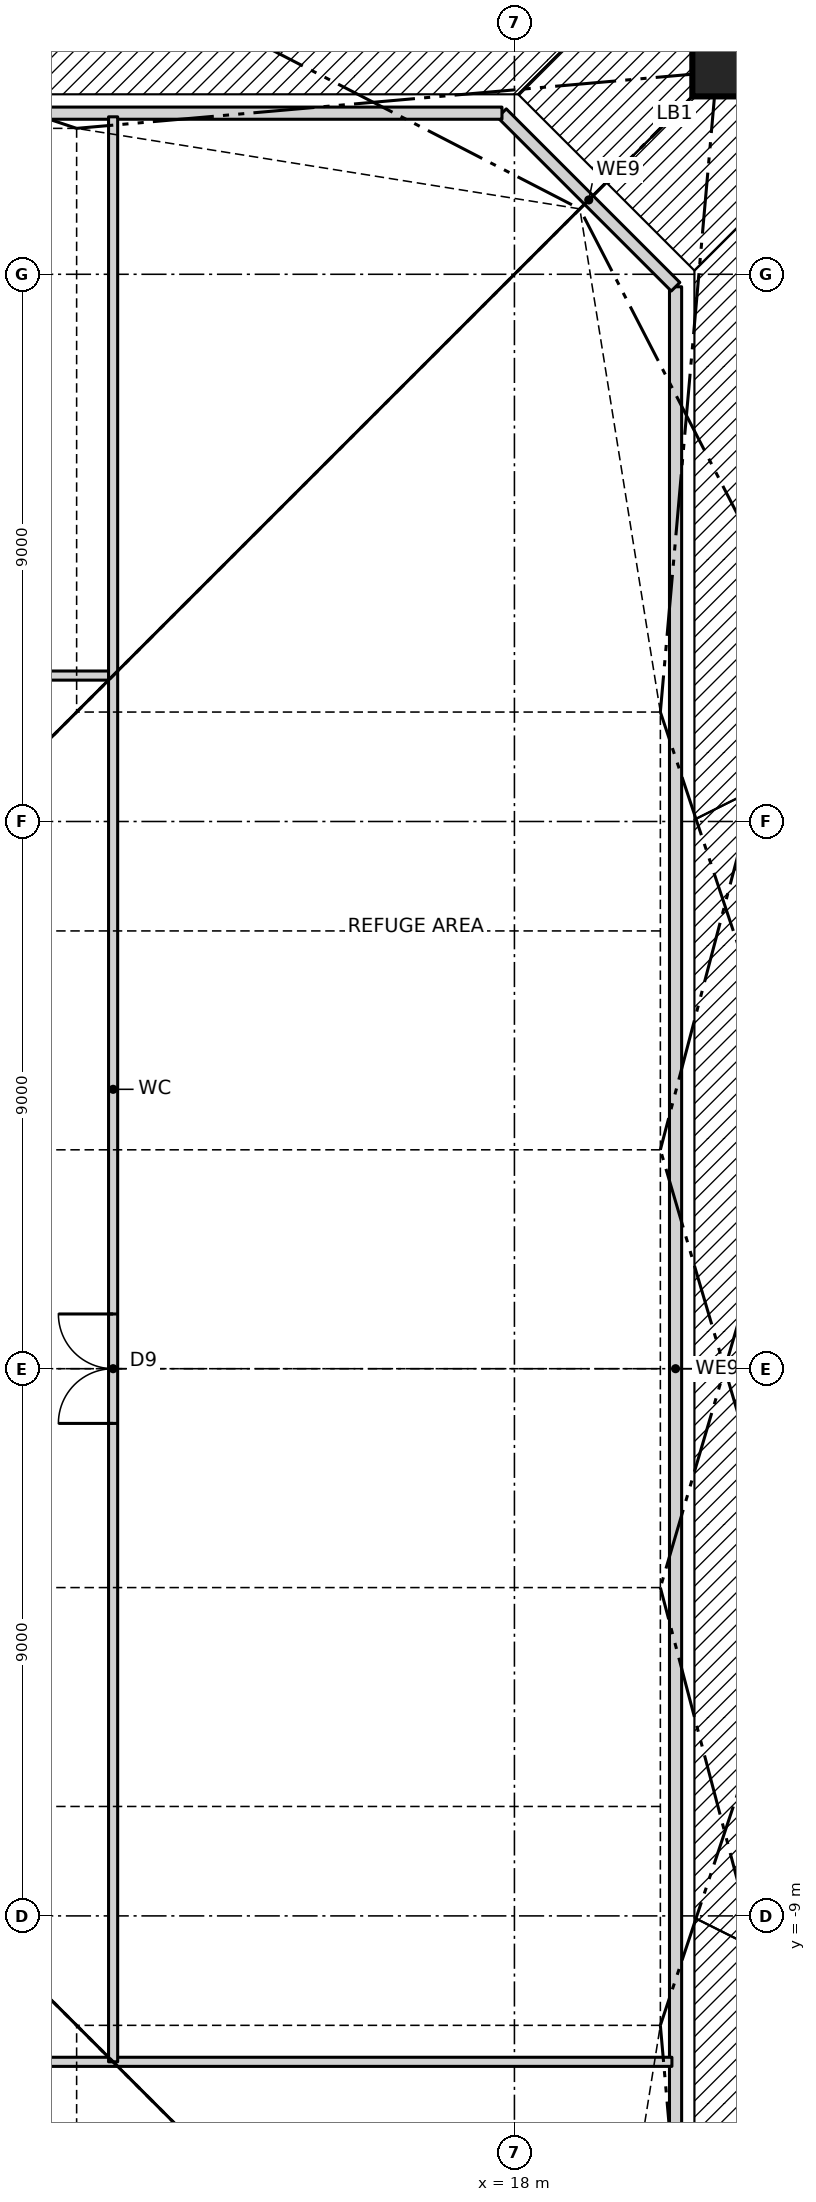
"""IFC4 building model, lengths in metres.
Left out: names, types, materials, properties, quantities, classifications, styles, units other than length and angle.
Written with IfcOpenShell. Run it as: python <this file> out.ifc"""

import sys

from ifc_helpers import new_model, si_unit, direction, frame, frame_2d, origin, origin_2d, place, context, subcontext, project, spatial, rectangle, hollow_rectangle, extrude, clip, halfspace, element, fill, save


model = new_model("IFC4")
c1 = context("Model", 3, precision=1e-05, world=origin(), true_north=direction((0.0, 1.0)))
c2 = subcontext(c1, "Body", "Model", "MODEL_VIEW")
j1 = project(units=[si_unit("LENGTHUNIT", "METRE"), si_unit("PLANEANGLEUNIT", "RADIAN")], contexts=[c1])
p1 = place(None, origin())
s1 = spatial("IfcSite", under=j1, at=p1, CompositionType="ELEMENT")
p2 = place(p1, origin())
s2 = spatial("IfcBuilding", under=s1, at=p2, CompositionType="ELEMENT")
p3 = place(p2, frame((0.0, 0.0, 74.5)))
s3 = spatial("IfcBuildingStorey", under=s2, at=p3, CompositionType="ELEMENT", Elevation=74.5)
p4 = place(p3, frame((22.65, -12.15, 0.0), z_axis=(-0.343583115532, 0.206127500627, 0.91622164142), x_axis=(-0.514454704863, -0.857517554715, 0.0)))
e1 = element("IfcColumn", 1, at=p4, inside=s3, PredefinedType="COLUMN", context=c2, shape_type="Clipping", body=[
    clip(clip(extrude(hollow_rectangle(XDim=0.8, YDim=0.8, WallThickness=0.09, at=origin_2d()), origin(), (0.0, 0.0, 1.0), 6.549), halfspace(frame((0.0, 0.0, 0.0), z_axis=(0.0, -0.400671815572, -0.91622164142), x_axis=(-0.514454704863, 0.785676141527, -0.343583115532)), False)), halfspace(frame((0.0, 2.404, 5.497), z_axis=(0.0, 0.400671815572, 0.91622164142), x_axis=(-0.514454704863, 0.785676141527, -0.343583115532)), False)),
])
p5 = place(p3, frame((22.65, -4.05, 0.0), z_axis=(-0.350261033367, 0.070044605522, 0.934029422311), x_axis=(-0.196095673508, -0.980584767795, 0.0)))
e2 = element("IfcColumn", 2, at=p5, inside=s3, PredefinedType="COLUMN", context=c2, shape_type="Clipping", body=[
    clip(clip(extrude(hollow_rectangle(XDim=0.8, YDim=0.8, WallThickness=0.09, at=origin_2d()), origin(), (0.0, 0.0, 1.0), 6.424), halfspace(frame((0.0, 0.0, 0.0), z_axis=(0.0, -0.357196078167, -0.934029422311), x_axis=(-0.196095673508, 0.91589502419, -0.350261033367)), False)), halfspace(frame((0.0, 2.143, 5.604), z_axis=(0.0, 0.357196078167, 0.934029422311), x_axis=(-0.196095673508, 0.91589502419, -0.350261033367)), False)),
])
p6 = place(p3, frame((22.65, 4.05, 0.0), z_axis=(-0.350261033367, -0.070044605522, 0.934029422311), x_axis=(0.196095673508, -0.980584767795, 0.0)))
e3 = element("IfcColumn", 3, at=p6, inside=s3, PredefinedType="COLUMN", context=c2, shape_type="Clipping", body=[
    clip(clip(extrude(hollow_rectangle(XDim=0.8, YDim=0.8, WallThickness=0.09, at=origin_2d()), origin(), (0.0, 0.0, 1.0), 6.424), halfspace(frame((0.0, 0.0, 0.0), z_axis=(0.0, -0.357196078167, -0.934029422311), x_axis=(0.196095673508, 0.91589502419, -0.350261033367)), False)), halfspace(frame((0.0, 2.143, 5.604), z_axis=(0.0, 0.357196078167, 0.934029422311), x_axis=(0.196095673508, 0.91589502419, -0.350261033367)), False)),
])
p7 = place(p3, frame((22.65, 12.15, 0.0), z_axis=(-0.343583115532, -0.206127500627, 0.91622164142), x_axis=(0.514454704863, -0.857517554715, 0.0)))
e4 = element("IfcColumn", 4, at=p7, inside=s3, PredefinedType="COLUMN", context=c2, shape_type="Clipping", body=[
    clip(clip(extrude(hollow_rectangle(XDim=0.8, YDim=0.8, WallThickness=0.09, at=origin_2d()), origin(), (0.0, 0.0, 1.0), 6.549), halfspace(frame((0.0, 0.0, 0.0), z_axis=(0.0, -0.400671815572, -0.91622164142), x_axis=(0.514454704863, 0.785676141527, -0.343583115532)), False)), halfspace(frame((0.0, 2.404, 5.497), z_axis=(0.0, 0.400671815572, 0.91622164142), x_axis=(0.514454704863, 0.785676141527, -0.343583115532)), False)),
])
p8 = place(p3, frame((21.326, 21.326, 0.0), z_axis=(-0.331294578225, -0.331294578225, 0.883452208599), x_axis=(0.707106781187, -0.707106781187, 0.0)))
e5 = element("IfcColumn", 5, at=p8, inside=s3, PredefinedType="COLUMN", context=c2, shape_type="Clipping", body=[
    clip(clip(extrude(hollow_rectangle(XDim=0.8, YDim=0.8, WallThickness=0.18, at=origin_2d()), origin(), (0.0, 0.0, 1.0), 6.792), halfspace(frame((0.0, 0.0, 0.0), z_axis=(0.0, -0.468521285666, -0.883452208599), x_axis=(0.707106781187, 0.624695047554, -0.331294578225)), False)), halfspace(frame((0.0, 2.811, 5.301), z_axis=(0.0, 0.468521285666, 0.883452208599), x_axis=(0.707106781187, 0.624695047554, -0.331294578225)), False)),
])
p9 = place(p3, frame((12.15, 22.65, 0.0), z_axis=(-0.206127500627, -0.343583115532, 0.91622164142), x_axis=(0.857517554715, -0.514454704863, 0.0)))
e6 = element("IfcColumn", 6, at=p9, inside=s3, PredefinedType="COLUMN", context=c2, shape_type="Clipping", body=[
    clip(clip(extrude(hollow_rectangle(XDim=0.8, YDim=0.8, WallThickness=0.09, at=origin_2d()), origin(), (0.0, 0.0, 1.0), 6.549), halfspace(frame((0.0, 0.0, 0.0), z_axis=(0.0, -0.400671815572, -0.91622164142), x_axis=(0.857517554715, 0.471354534126, -0.206127500627)), False)), halfspace(frame((0.0, 2.404, 5.497), z_axis=(0.0, 0.400671815572, 0.91622164142), x_axis=(0.857517554715, 0.471354534126, -0.206127500627)), False)),
])
p10 = place(p3, frame((20.65, -17.795, 0.0), z_axis=(0.0, 0.0, 1.0), x_axis=(0.0, 1.0, 0.0)))
e7 = element("IfcWall", 7, at=p10, inside=s3, PredefinedType="PARTITIONING", context=c2, shape_type="SweptSolid", body=[
    extrude(rectangle(XDim=35.59, YDim=0.2, at=frame_2d((17.795, 0.0))), origin(), (0.0, 0.0, 1.0), 5.7),
])
p11 = place(p3, frame((20.65, 17.795, 0.0), z_axis=(0.0, 0.0, 1.0), x_axis=(-0.707106781187, 0.707106781187, 0.0)))
e8 = element("IfcWall", 8, at=p11, inside=s3, PredefinedType="PARTITIONING", context=c2, shape_type="SweptSolid", body=[
    extrude(rectangle(XDim=4.038, YDim=0.2, at=frame_2d((2.019, 0.0))), origin(), (0.0, 0.0, 1.0), 5.7),
])
p12 = place(p3, frame((17.795, 20.65, 0.0), z_axis=(0.0, 0.0, 1.0), x_axis=(-1.0, 0.0, 0.0)))
e9 = element("IfcWall", 9, at=p12, inside=s3, PredefinedType="PARTITIONING", context=c2, shape_type="SweptSolid", body=[
    extrude(rectangle(XDim=35.59, YDim=0.2, at=frame_2d((17.795, 0.0))), origin(), (0.0, 0.0, 1.0), 5.7),
])
p13 = place(p3, frame((-11.4, -11.4, 0.0), z_axis=(0.0, 0.0, 1.0), x_axis=(1.0, 0.0, 0.0)))
e10 = element("IfcWall", 10, at=p13, inside=s3, PredefinedType="PARTITIONING", context=c2, shape_type="SweptSolid", body=[
    extrude(rectangle(XDim=31.99, YDim=0.15, at=frame_2d((15.995, 0.0))), origin(), (0.0, 0.0, 1.0), 5.77),
])
p14 = place(p13, frame((4.1, 0.0, 0.0)))
e11 = element("IfcOpeningElement", 11, at=p14, cuts=e10, PredefinedType="OPENING", context=c2, shape_type="SweptSolid", body=[
    extrude(rectangle(XDim=1.8, YDim=2.1, at=frame_2d((0.9, 1.05))), frame((0.0, 0.085, 0.0), z_axis=(0.0, -1.0, 0.0), x_axis=(1.0, 0.0, 0.0)), (0.0, 0.0, 1.0), 0.17),
])
p15 = place(p13, frame((12.6, 0.0, 0.0)))
e12 = element("IfcOpeningElement", 12, at=p15, cuts=e10, PredefinedType="OPENING", context=c2, shape_type="SweptSolid", body=[
    extrude(rectangle(XDim=1.8, YDim=2.1, at=frame_2d((0.9, 1.05))), frame((0.0, 0.085, 0.0), z_axis=(0.0, -1.0, 0.0), x_axis=(1.0, 0.0, 0.0)), (0.0, 0.0, 1.0), 0.17),
])
p16 = place(p13, frame((19.0, 0.0, 0.0)))
e13 = element("IfcOpeningElement", 13, at=p16, cuts=e10, PredefinedType="OPENING", context=c2, shape_type="SweptSolid", body=[
    extrude(rectangle(XDim=1.8, YDim=2.1, at=frame_2d((0.9, 1.05))), frame((0.0, 0.085, 0.0), z_axis=(0.0, -1.0, 0.0), x_axis=(1.0, 0.0, 0.0)), (0.0, 0.0, 1.0), 0.17),
])
p17 = place(p3, frame((-20.59, 11.4, 0.0), z_axis=(0.0, 0.0, 1.0), x_axis=(1.0, 0.0, 0.0)))
e14 = element("IfcWall", 14, at=p17, inside=s3, PredefinedType="PARTITIONING", context=c2, shape_type="SweptSolid", body=[
    extrude(rectangle(XDim=31.99, YDim=0.15, at=frame_2d((15.995, 0.0))), origin(), (0.0, 0.0, 1.0), 5.77),
])
p18 = place(p17, frame((27.59, 0.0, 0.0)))
e15 = element("IfcOpeningElement", 15, at=p18, cuts=e14, PredefinedType="OPENING", context=c2, shape_type="SweptSolid", body=[
    extrude(rectangle(XDim=1.8, YDim=2.1, at=frame_2d((0.9, 1.05))), frame((0.0, 0.085, 0.0), z_axis=(0.0, -1.0, 0.0), x_axis=(1.0, 0.0, 0.0)), (0.0, 0.0, 1.0), 0.17),
])
p19 = place(p17, frame((20.09, 0.0, 0.0)))
e16 = element("IfcOpeningElement", 16, at=p19, cuts=e14, PredefinedType="OPENING", context=c2, shape_type="SweptSolid", body=[
    extrude(rectangle(XDim=1.8, YDim=2.1, at=frame_2d((0.9, 1.05))), frame((0.0, 0.085, 0.0), z_axis=(0.0, -1.0, 0.0), x_axis=(1.0, 0.0, 0.0)), (0.0, 0.0, 1.0), 0.17),
])
p20 = place(p17, frame((12.19, 0.0, 0.0)))
e17 = element("IfcOpeningElement", 17, at=p20, cuts=e14, PredefinedType="OPENING", context=c2, shape_type="SweptSolid", body=[
    extrude(rectangle(XDim=1.8, YDim=2.1, at=frame_2d((0.9, 1.05))), frame((0.0, 0.085, 0.0), z_axis=(0.0, -1.0, 0.0), x_axis=(1.0, 0.0, 0.0)), (0.0, 0.0, 1.0), 0.17),
])
p21 = place(p3, frame((11.4, -11.4, 0.0), z_axis=(0.0, 0.0, 1.0), x_axis=(0.0, 1.0, 0.0)))
e18 = element("IfcWall", 18, at=p21, inside=s3, PredefinedType="PARTITIONING", context=c2, shape_type="SweptSolid", body=[
    extrude(rectangle(XDim=31.99, YDim=0.15, at=frame_2d((15.995, 0.0))), origin(), (0.0, 0.0, 1.0), 5.77),
])
p22 = place(p21, frame((10.5, 0.0, 0.0)))
e19 = element("IfcOpeningElement", 19, at=p22, cuts=e18, PredefinedType="OPENING", context=c2, shape_type="SweptSolid", body=[
    extrude(rectangle(XDim=1.8, YDim=2.1, at=frame_2d((0.9, 1.05))), frame((0.0, 0.085, 0.0), z_axis=(0.0, -1.0, 0.0), x_axis=(1.0, 0.0, 0.0)), (0.0, 0.0, 1.0), 0.17),
])
p23 = place(p22, origin())
e20 = element("IfcDoor", 20, at=p23, inside=s3, OperationType="DOUBLE_DOOR_SINGLE_SWING", PredefinedType="DOOR", context=c2, shape_type="SweptSolid", body=[
    extrude(rectangle(XDim=1.8, YDim=2.1, at=frame_2d((0.9, 1.05))), frame((0.0, 0.025, 0.0), z_axis=(0.0, -1.0, 0.0), x_axis=(1.0, 0.0, 0.0)), (0.0, 0.0, 1.0), 0.05),
])
fill(e19, e20)
save(model, sys.argv[1])
